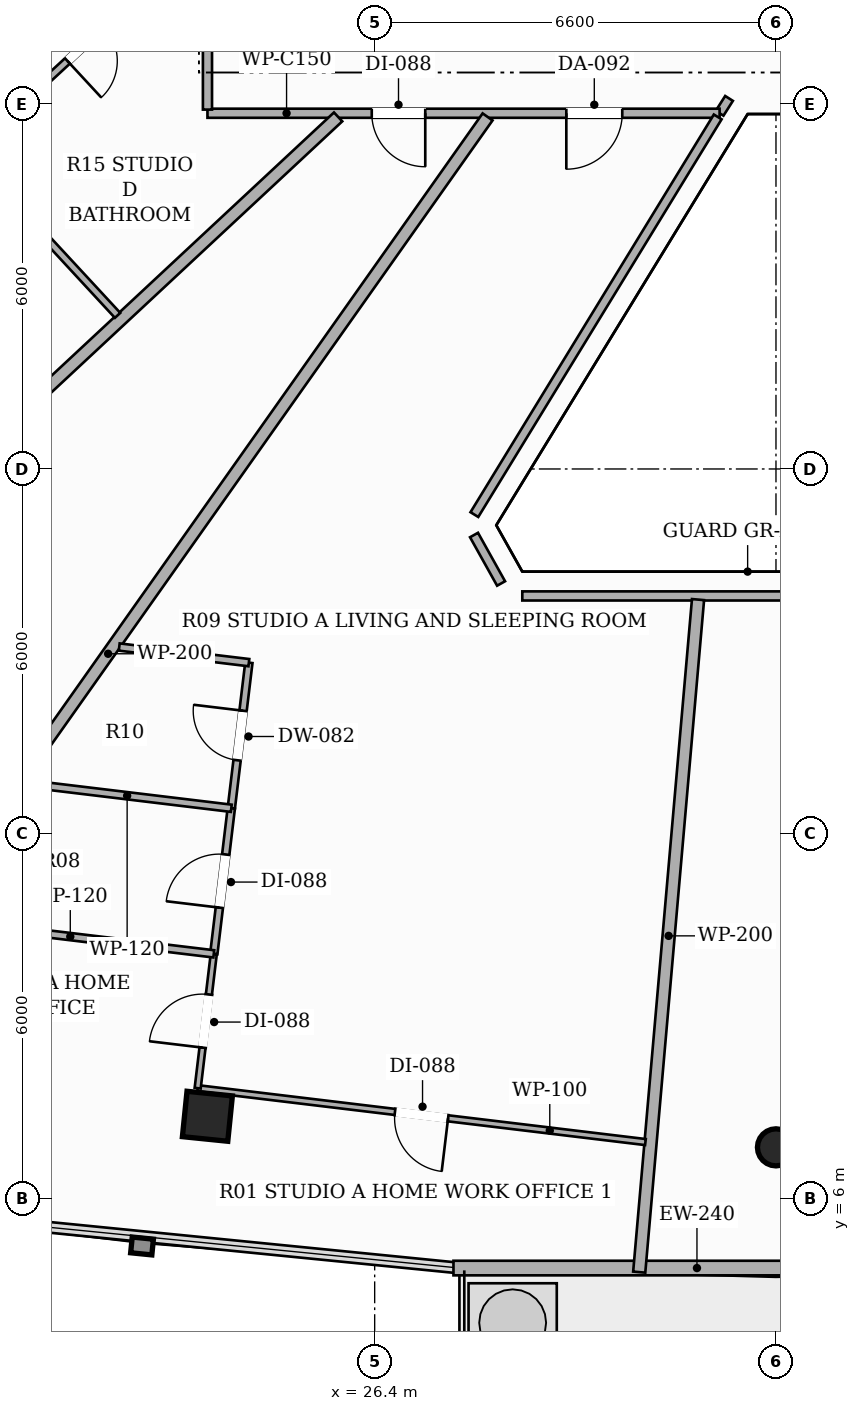
"""IFC4 building model, lengths in metres.
Left out: names, types, materials, properties, quantities, classifications, styles, units other than length and angle.
Written with IfcOpenShell. Run it as: python <this file> out.ifc"""

import sys

from ifc_helpers import new_model, si_unit, direction, frame, frame_2d, origin, origin_2d, place, context, subcontext, project, spatial, rectangle, hollow_rectangle, hollow_circle, extrude, element, fill, save


model = new_model("IFC4")
c1 = context("Model", 3, precision=1e-05, world=origin(), true_north=direction((0.0, 1.0)))
c2 = subcontext(c1, "Body", "Model", "MODEL_VIEW")
j1 = project(units=[si_unit("LENGTHUNIT", "METRE"), si_unit("PLANEANGLEUNIT", "RADIAN")], contexts=[c1])
p1 = place(None, origin())
s1 = spatial("IfcSite", under=j1, at=p1, CompositionType="ELEMENT")
p2 = place(p1, origin())
s2 = spatial("IfcBuilding", under=s1, at=p2, CompositionType="ELEMENT")
p3 = place(p2, frame((0.0, 0.0, 222.8)))
s3 = spatial("IfcBuildingStorey", under=s2, at=p3, CompositionType="ELEMENT", Elevation=222.8)
p4 = place(p3, frame((23.649, 7.355, 0.0), z_axis=(0.0, 0.0, 1.0), x_axis=(-0.994880708829, 0.101056297183, 0.0)))
e1 = element("IfcColumn", 1, at=p4, inside=s3, PredefinedType="COLUMN", context=c2, shape_type="SweptSolid", body=[
    extrude(hollow_rectangle(XDim=0.75, YDim=0.75, WallThickness=0.025, at=origin_2d()), origin(), (0.0, 0.0, 1.0), 3.3),
])
p5 = place(p3, frame((33.0, 6.844, 0.0), z_axis=(0.0, 0.0, 1.0), x_axis=(1.0, 0.0, 0.0)))
e2 = element("IfcColumn", 2, at=p5, inside=s3, PredefinedType="COLUMN", context=c2, shape_type="SweptSolid", body=[
    extrude(hollow_circle(Radius=0.305, WallThickness=0.016, at=origin_2d()), origin(), (0.0, 0.0, 1.0), 3.3),
])
p6 = place(p3, frame((21.458, 33.042, 0.0), z_axis=(0.0, 0.0, 1.0), x_axis=(-0.51433465168, -0.857589567381, 0.0)))
e3 = element("IfcWall", 3, at=p6, inside=s3, PredefinedType="SOLIDWALL", context=c2, shape_type="SweptSolid", body=[
    extrude(rectangle(XDim=10.252, YDim=0.24, at=frame_2d((5.126, 0.0))), origin(), (0.0, 0.0, 1.0), 2.624),
])
p7 = place(p6, frame((7.754, 0.0, 0.0)))
e4 = element("IfcOpeningElement", 4, at=p7, cuts=e3, PredefinedType="OPENING", context=c2, shape_type="SweptSolid", body=[
    extrude(rectangle(XDim=1.8, YDim=2.2, at=frame_2d((0.9, 1.1))), frame((0.0, 0.13, 0.0), z_axis=(0.0, -1.0, 0.0), x_axis=(1.0, 0.0, 0.0)), (0.0, 0.0, 1.0), 0.26),
])
p8 = place(p3, frame((27.696, 4.859, 0.0), z_axis=(0.0, 0.0, 1.0), x_axis=(1.0, 0.0, 0.0)))
e5 = element("IfcWall", 5, at=p8, inside=s3, PredefinedType="SOLIDWALL", context=c2, shape_type="SweptSolid", body=[
    extrude(rectangle(XDim=10.608, YDim=0.24, at=frame_2d((5.304, 0.0))), origin(), (0.0, 0.0, 1.0), 2.624),
])
p9 = place(p8, frame((8.109, 0.0, 0.0)))
e6 = element("IfcOpeningElement", 6, at=p9, cuts=e5, PredefinedType="OPENING", context=c2, shape_type="SweptSolid", body=[
    extrude(rectangle(XDim=1.8, YDim=2.2, at=frame_2d((0.9, 1.1))), frame((0.0, 0.13, 0.0), z_axis=(0.0, -1.0, 0.0), x_axis=(1.0, 0.0, 0.0)), (0.0, 0.0, 1.0), 0.26),
])
p10 = place(p3, frame((32.228, 24.094, 0.0), z_axis=(0.0, 0.0, 1.0), x_axis=(-0.53643811989, -0.843939656331, 0.0)))
e7 = element("IfcWall", 7, at=p10, inside=s3, PredefinedType="PARTITIONING", context=c2, shape_type="SweptSolid", body=[
    extrude(rectangle(XDim=0.289, YDim=0.15, at=frame_2d((0.145, 0.0))), origin(), (0.0, 0.0, 1.0), 3.06),
])
p11 = place(p3, frame((32.073, 23.85, 0.0), z_axis=(0.0, 0.0, 1.0), x_axis=(-1.0, 0.0, 0.0)))
e8 = element("IfcWall", 8, at=p11, inside=s3, PredefinedType="PARTITIONING", context=c2, shape_type="SweptSolid", body=[
    extrude(rectangle(XDim=8.423, YDim=0.15, at=frame_2d((4.211, 0.0))), origin(), (0.0, 0.0, 1.0), 2.565),
])
p12 = place(p11, frame((1.601, 0.0, 0.0)))
e9 = element("IfcOpeningElement", 9, at=p12, cuts=e8, PredefinedType="OPENING", context=c2, shape_type="SweptSolid", body=[
    extrude(rectangle(XDim=0.92, YDim=2.15, at=frame_2d((0.46, 1.075))), frame((0.0, 0.085, 0.0), z_axis=(0.0, -1.0, 0.0), x_axis=(1.0, 0.0, 0.0)), (0.0, 0.0, 1.0), 0.17),
])
p13 = place(p11, frame((4.841, 0.0, 0.0)))
e10 = element("IfcOpeningElement", 10, at=p13, cuts=e8, PredefinedType="OPENING", context=c2, shape_type="SweptSolid", body=[
    extrude(rectangle(XDim=0.88, YDim=2.1, at=frame_2d((0.44, 1.05))), frame((0.0, 0.085, 0.0), z_axis=(0.0, -1.0, 0.0), x_axis=(1.0, 0.0, 0.0)), (0.0, 0.0, 1.0), 0.17),
])
p14 = place(p3, frame((23.65, 23.91, 0.0), z_axis=(0.0, 0.0, 1.0), x_axis=(0.0, 1.0, 0.0)))
e11 = element("IfcWall", 11, at=p14, inside=s3, PredefinedType="PARTITIONING", context=c2, shape_type="SweptSolid", body=[
    extrude(rectangle(XDim=12.163, YDim=0.15, at=frame_2d((6.082, 0.0))), origin(), (0.0, 0.0, 1.0), 2.492),
])
p15 = place(p14, frame((5.622, 0.0, 0.0)))
e12 = element("IfcOpeningElement", 12, at=p15, cuts=e11, PredefinedType="OPENING", context=c2, shape_type="SweptSolid", body=[
    extrude(rectangle(XDim=0.92, YDim=2.15, at=frame_2d((0.46, 1.075))), frame((0.0, 0.085, 0.0), z_axis=(0.0, -1.0, 0.0), x_axis=(1.0, 0.0, 0.0)), (0.0, 0.0, 1.0), 0.17),
])
p16 = place(p3, frame((37.172, 15.912, 0.0), z_axis=(0.0, 0.0, 1.0), x_axis=(-1.0, 0.0, 0.0)))
e13 = element("IfcWall", 13, at=p16, inside=s3, PredefinedType="PARTITIONING", context=c2, shape_type="SweptSolid", body=[
    extrude(rectangle(XDim=8.344, YDim=0.15, at=frame_2d((4.172, 0.0))), origin(), (0.0, 0.0, 1.0), 2.773),
])
p17 = place(p3, frame((28.479, 16.117, 0.0), z_axis=(0.0, 0.0, 1.0), x_axis=(-0.487503666908, 0.873120939361, 0.0)))
e14 = element("IfcWall", 14, at=p17, inside=s3, PredefinedType="PARTITIONING", context=c2, shape_type="SweptSolid", body=[
    extrude(rectangle(XDim=0.913, YDim=0.15, at=frame_2d((0.457, 0.0))), origin(), (0.0, 0.0, 1.0), 3.06),
])
p18 = place(p3, frame((28.04, 17.25, 0.0), z_axis=(0.0, 0.0, 1.0), x_axis=(0.521949656317, 0.852976292912, 0.0)))
e15 = element("IfcWall", 15, at=p18, inside=s3, PredefinedType="PARTITIONING", context=c2, shape_type="SweptSolid", body=[
    extrude(rectangle(XDim=7.667, YDim=0.15, at=frame_2d((3.833, 0.0))), origin(), (0.0, 0.0, 1.0), 2.773),
])
p19 = place(p3, frame((31.718, 15.852, 0.0), z_axis=(0.0, 0.0, 1.0), x_axis=(-0.087103117533, -0.996199300801, 0.0)))
e16 = element("IfcWall", 16, at=p19, inside=s3, PredefinedType="PARTITIONING", context=c2, shape_type="SweptSolid", body=[
    extrude(rectangle(XDim=11.102, YDim=0.2, at=frame_2d((5.551, 0.0))), origin(), (0.0, 0.0, 1.0), 2.492),
])
p20 = place(p3, frame((15.776, 6.132, 0.0), z_axis=(0.0, 0.0, 1.0), x_axis=(0.577200381612, 0.816602546816, 0.0)))
e17 = element("IfcWall", 17, at=p20, inside=s3, PredefinedType="PARTITIONING", context=c2, shape_type="SweptSolid", body=[
    extrude(rectangle(XDim=21.624, YDim=0.2, at=frame_2d((10.812, 0.0))), origin(), (0.0, 0.0, 1.0), 2.492),
])
p21 = place(p3, frame((25.799, 23.79, 0.0), z_axis=(0.0, 0.0, 1.0), x_axis=(-0.731584830333, -0.681750420629, 0.0)))
e18 = element("IfcWall", 18, at=p21, inside=s3, PredefinedType="PARTITIONING", context=c2, shape_type="SweptSolid", body=[
    extrude(rectangle(XDim=21.776, YDim=0.2, at=frame_2d((10.888, 0.0))), origin(), (0.0, 0.0, 1.0), 2.492),
])
p22 = place(p3, frame((24.042, 12.42, 0.0), z_axis=(0.0, 0.0, 1.0), x_axis=(0.119823599825, 0.992795197876, 0.0)))
e19 = element("IfcWall", 19, at=p22, inside=s3, PredefinedType="PARTITIONING", context=c2, shape_type="SweptSolid", body=[
    extrude(rectangle(XDim=2.412, YDim=0.12, at=frame_2d((1.206, 0.0))), origin(), (0.0, 0.0, 1.0), 3.06),
])
p23 = place(p22, frame((0.796, 0.0, 0.0)))
e20 = element("IfcOpeningElement", 20, at=p23, cuts=e19, PredefinedType="OPENING", context=c2, shape_type="SweptSolid", body=[
    extrude(rectangle(XDim=0.82, YDim=2.1, at=frame_2d((0.41, 1.05))), frame((0.0, 0.07, 0.0), z_axis=(0.0, -1.0, 0.0), x_axis=(1.0, 0.0, 0.0)), (0.0, 0.0, 1.0), 0.14),
])
p24 = place(p3, frame((24.331, 14.815, 0.0), z_axis=(0.0, 0.0, 1.0), x_axis=(-0.992808897326, 0.119710038805, 0.0)))
e21 = element("IfcWall", 21, at=p24, inside=s3, PredefinedType="PARTITIONING", context=c2, shape_type="SweptSolid", body=[
    extrude(rectangle(XDim=2.147, YDim=0.12, at=frame_2d((1.074, 0.0))), origin(), (0.0, 0.0, 1.0), 3.06),
])
p25 = place(p3, frame((23.754, 10.026, 0.0), z_axis=(0.0, 0.0, 1.0), x_axis=(0.119472593193, 0.992837499028, 0.0)))
e22 = element("IfcWall", 22, at=p25, inside=s3, PredefinedType="PARTITIONING", context=c2, shape_type="SweptSolid", body=[
    extrude(rectangle(XDim=2.411, YDim=0.12, at=frame_2d((1.206, 0.0))), origin(), (0.0, 0.0, 1.0), 3.06),
])
p26 = place(p25, frame((0.766, 0.0, 0.0)))
e23 = element("IfcOpeningElement", 23, at=p26, cuts=e22, PredefinedType="OPENING", context=c2, shape_type="SweptSolid", body=[
    extrude(rectangle(XDim=0.88, YDim=2.1, at=frame_2d((0.44, 1.05))), frame((0.0, 0.07, 0.0), z_axis=(0.0, -1.0, 0.0), x_axis=(1.0, 0.0, 0.0)), (0.0, 0.0, 1.0), 0.14),
])
p27 = place(p3, frame((30.853, 6.931, 0.0), z_axis=(0.0, 0.0, 1.0), x_axis=(-0.992840033501, 0.119451529409, 0.0)))
e24 = element("IfcWall", 24, at=p27, inside=s3, PredefinedType="PARTITIONING", context=c2, shape_type="SweptSolid", body=[
    extrude(rectangle(XDim=7.417, YDim=0.1, at=frame_2d((3.708, 0.0))), origin(), (0.0, 0.0, 1.0), 2.492),
])
p28 = place(p27, frame((3.269, 0.0, 0.0)))
e25 = element("IfcOpeningElement", 25, at=p28, cuts=e24, PredefinedType="OPENING", context=c2, shape_type="SweptSolid", body=[
    extrude(rectangle(XDim=0.88, YDim=2.1, at=frame_2d((0.44, 1.05))), frame((0.0, 0.06, 0.0), z_axis=(0.0, -1.0, 0.0), x_axis=(1.0, 0.0, 0.0)), (0.0, 0.0, 1.0), 0.12),
])
p29 = place(p3, frame((23.489, 7.817, 0.0), z_axis=(0.0, 0.0, 1.0), x_axis=(0.119063005136, 0.992886700892, 0.0)))
e26 = element("IfcWall", 26, at=p29, inside=s3, PredefinedType="PARTITIONING", context=c2, shape_type="SweptSolid", body=[
    extrude(rectangle(XDim=2.225, YDim=0.1, at=frame_2d((1.112, 0.0))), origin(), (0.0, 0.0, 1.0), 2.492),
])
p30 = place(p29, frame((0.672, 0.0, 0.0)))
e27 = element("IfcOpeningElement", 27, at=p30, cuts=e26, PredefinedType="OPENING", context=c2, shape_type="SweptSolid", body=[
    extrude(rectangle(XDim=0.88, YDim=2.1, at=frame_2d((0.44, 1.05))), frame((0.0, 0.06, 0.0), z_axis=(0.0, -1.0, 0.0), x_axis=(1.0, 0.0, 0.0)), (0.0, 0.0, 1.0), 0.12),
])
p31 = place(p3, frame((24.042, 12.42, 0.0), z_axis=(0.0, 0.0, 1.0), x_axis=(-0.992809391247, 0.119705942421, 0.0)))
e28 = element("IfcWall", 28, at=p31, inside=s3, PredefinedType="PARTITIONING", context=c2, shape_type="SweptSolid", body=[
    extrude(rectangle(XDim=3.451, YDim=0.12, at=frame_2d((1.726, 0.0))), origin(), (0.0, 0.0, 1.0), 2.773),
])
p32 = place(p3, frame((23.754, 10.026, 0.0), z_axis=(0.0, 0.0, 1.0), x_axis=(-0.992834006213, 0.1195016155, 0.0)))
e29 = element("IfcWall", 29, at=p32, inside=s3, PredefinedType="PARTITIONING", context=c2, shape_type="SweptSolid", body=[
    extrude(rectangle(XDim=4.754, YDim=0.12, at=frame_2d((2.377, 0.0))), origin(), (0.0, 0.0, 1.0), 2.773),
])
p33 = place(p3, frame((23.59, 26.786, 0.0), z_axis=(0.0, 0.0, 1.0), x_axis=(-0.733888422473, -0.679270037143, 0.0)))
e30 = element("IfcWall", 30, at=p33, inside=s3, PredefinedType="PARTITIONING", context=c2, shape_type="SweptSolid", body=[
    extrude(rectangle(XDim=5.292, YDim=0.12, at=frame_2d((2.646, 0.0))), origin(), (0.0, 0.0, 1.0), 3.06),
])
p34 = place(p33, frame((2.236, 0.0, 0.0)))
e31 = element("IfcOpeningElement", 31, at=p34, cuts=e30, PredefinedType="OPENING", context=c2, shape_type="SweptSolid", body=[
    extrude(rectangle(XDim=0.82, YDim=2.1, at=frame_2d((0.41, 1.05))), frame((0.0, 0.07, 0.0), z_axis=(0.0, -1.0, 0.0), x_axis=(1.0, 0.0, 0.0)), (0.0, 0.0, 1.0), 0.14),
])
p35 = place(p3, frame((22.172, 20.526, 0.0), z_axis=(0.0, 0.0, 1.0), x_axis=(-0.67917603964, 0.733975413198, 0.0)))
e32 = element("IfcWall", 32, at=p35, inside=s3, PredefinedType="PARTITIONING", context=c2, shape_type="SweptSolid", body=[
    extrude(rectangle(XDim=3.631, YDim=0.12, at=frame_2d((1.815, 0.0))), origin(), (0.0, 0.0, 1.0), 2.565),
])
p36 = place(p12, origin())
e33 = element("IfcDoor", 33, at=p36, inside=s3, OperationType="SINGLE_SWING_RIGHT", PredefinedType="DOOR", context=c2, shape_type="SweptSolid", body=[
    extrude(rectangle(XDim=0.92, YDim=2.15, at=frame_2d((0.46, 1.075))), frame((0.0, 0.025, 0.0), z_axis=(0.0, -1.0, 0.0), x_axis=(1.0, 0.0, 0.0)), (0.0, 0.0, 1.0), 0.05),
])
fill(e9, e33)
p37 = place(p23, origin())
e34 = element("IfcDoor", 34, at=p37, inside=s3, OperationType="SINGLE_SWING_RIGHT", PredefinedType="DOOR", context=c2, shape_type="SweptSolid", body=[
    extrude(rectangle(XDim=0.82, YDim=2.1, at=frame_2d((0.41, 1.05))), frame((0.0, 0.025, 0.0), z_axis=(0.0, -1.0, 0.0), x_axis=(1.0, 0.0, 0.0)), (0.0, 0.0, 1.0), 0.05),
])
fill(e20, e34)
p38 = place(p26, origin())
e35 = element("IfcDoor", 35, at=p38, inside=s3, OperationType="SINGLE_SWING_LEFT", PredefinedType="DOOR", context=c2, shape_type="SweptSolid", body=[
    extrude(rectangle(XDim=0.88, YDim=2.1, at=frame_2d((0.44, 1.05))), frame((0.0, 0.025, 0.0), z_axis=(0.0, -1.0, 0.0), x_axis=(1.0, 0.0, 0.0)), (0.0, 0.0, 1.0), 0.05),
])
fill(e23, e35)
p39 = place(p28, origin())
e36 = element("IfcDoor", 36, at=p39, inside=s3, OperationType="SINGLE_SWING_LEFT", PredefinedType="DOOR", context=c2, shape_type="SweptSolid", body=[
    extrude(rectangle(XDim=0.88, YDim=2.1, at=frame_2d((0.44, 1.05))), frame((0.0, 0.025, 0.0), z_axis=(0.0, -1.0, 0.0), x_axis=(1.0, 0.0, 0.0)), (0.0, 0.0, 1.0), 0.05),
])
fill(e25, e36)
p40 = place(p30, origin())
e37 = element("IfcDoor", 37, at=p40, inside=s3, OperationType="SINGLE_SWING_LEFT", PredefinedType="DOOR", context=c2, shape_type="SweptSolid", body=[
    extrude(rectangle(XDim=0.88, YDim=2.1, at=frame_2d((0.44, 1.05))), frame((0.0, 0.025, 0.0), z_axis=(0.0, -1.0, 0.0), x_axis=(1.0, 0.0, 0.0)), (0.0, 0.0, 1.0), 0.05),
])
fill(e27, e37)
p41 = place(p34, origin())
e38 = element("IfcDoor", 38, at=p41, inside=s3, OperationType="SINGLE_SWING_RIGHT", PredefinedType="DOOR", context=c2, shape_type="SweptSolid", body=[
    extrude(rectangle(XDim=0.82, YDim=2.1, at=frame_2d((0.41, 1.05))), frame((0.0, 0.025, 0.0), z_axis=(0.0, -1.0, 0.0), x_axis=(1.0, 0.0, 0.0)), (0.0, 0.0, 1.0), 0.05),
])
fill(e31, e38)
p42 = place(p13, origin())
e39 = element("IfcDoor", 39, at=p42, inside=s3, OperationType="SINGLE_SWING_LEFT", PredefinedType="DOOR", context=c2, shape_type="SweptSolid", body=[
    extrude(rectangle(XDim=0.88, YDim=2.1, at=frame_2d((0.44, 1.05))), frame((0.0, 0.025, 0.0), z_axis=(0.0, -1.0, 0.0), x_axis=(1.0, 0.0, 0.0)), (0.0, 0.0, 1.0), 0.05),
])
fill(e10, e39)
save(model, sys.argv[1])
